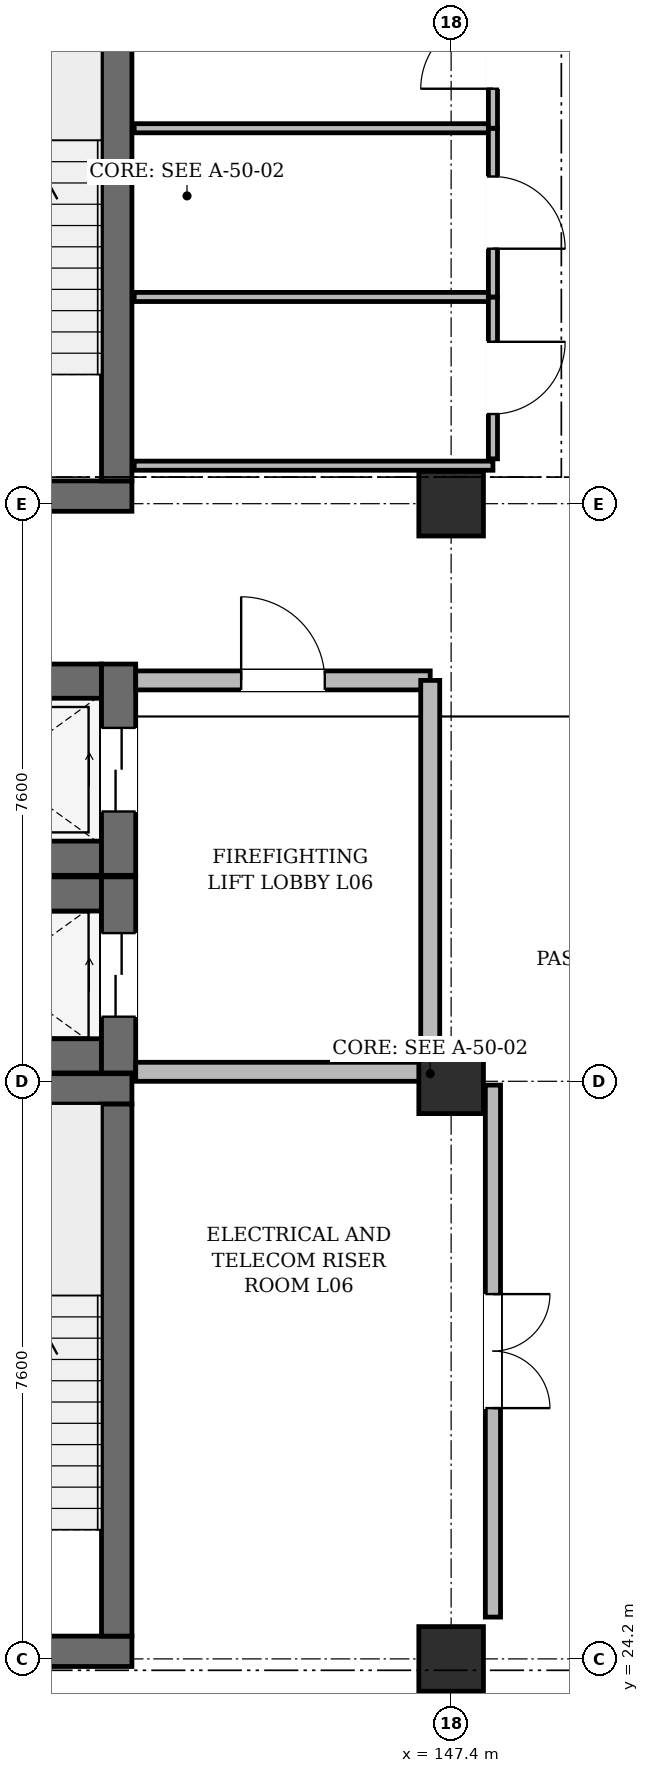
"""IFC4 building model, lengths in metres.
Left out: names, types, materials, properties, quantities, classifications, styles, units other than length and angle.
Written with IfcOpenShell. Run it as: python <this file> out.ifc"""

import sys

from ifc_helpers import new_model, si_unit, direction, frame, frame_2d, origin, origin_2d, place, context, subcontext, project, spatial, rectangle, extrude, element, fill, save


model = new_model("IFC4")
c1 = context("Model", 3, precision=1e-05, world=origin(), true_north=direction((0.0, 1.0)))
c2 = subcontext(c1, "Body", "Model", "MODEL_VIEW")
j1 = project(units=[si_unit("LENGTHUNIT", "METRE"), si_unit("PLANEANGLEUNIT", "RADIAN")], contexts=[c1])
p1 = place(None, origin())
s1 = spatial("IfcSite", under=j1, at=p1, CompositionType="ELEMENT")
p2 = place(p1, origin())
s2 = spatial("IfcBuilding", under=s1, at=p2, CompositionType="ELEMENT")
p3 = place(p2, frame((0.0, 0.0, 28.2)))
s3 = spatial("IfcBuildingStorey", under=s2, at=p3, CompositionType="ELEMENT", Elevation=28.2)
for number, where, z_axis, x_axis in (
    (1, (147.4, 24.2, 0.0), (0.0, 0.0, 1.0), (1.0, 0.0, 0.0)),
    (2, (147.4, 31.8, 0.0), (0.0, 0.0, 1.0), (1.0, 0.0, 0.0)),
    (3, (147.4, 39.4, 0.0), (0.0, 0.0, 1.0), (1.0, 0.0, 0.0)),
):
    element("IfcColumn", number, at=place(p3, frame(where, z_axis=z_axis, x_axis=x_axis)), inside=s3, PredefinedType="COLUMN", context=c2, shape_type="SweptSolid", body=[
        extrude(rectangle(XDim=0.85, YDim=0.85, at=origin_2d()), origin(), (0.0, 0.0, 1.0), 3.94),
    ])
p4 = place(p3, frame((139.4, 24.3, 0.0), z_axis=(0.0, 0.0, 1.0), x_axis=(1.0, 0.0, 0.0)))
e4 = element("IfcWall", 4, at=p4, inside=s3, PredefinedType="SHEAR", context=c2, shape_type="SweptSolid", body=[
    extrude(rectangle(XDim=3.8, YDim=0.4, at=frame_2d((1.9, 0.0))), origin(), (0.0, 0.0, 1.0), 3.94),
])
p5 = place(p4, frame((1.3, 0.0, 0.0)))
e5 = element("IfcOpeningElement", 5, at=p5, cuts=e4, PredefinedType="OPENING", context=c2, shape_type="SweptSolid", body=[
    extrude(rectangle(XDim=1.2, YDim=2.2, at=frame_2d((0.6, 1.1))), frame((0.0, 0.212, 0.0), z_axis=(0.0, -1.0, 0.0), x_axis=(1.0, 0.0, 0.0)), (0.0, 0.0, 1.0), 0.424),
])
p6 = place(p3, frame((139.4, 31.7, 0.0), z_axis=(0.0, 0.0, 1.0), x_axis=(1.0, 0.0, 0.0)))
e6 = element("IfcWall", 6, at=p6, inside=s3, PredefinedType="SHEAR", context=c2, shape_type="SweptSolid", body=[
    extrude(rectangle(XDim=3.8, YDim=0.4, at=frame_2d((1.9, 0.0))), origin(), (0.0, 0.0, 1.0), 3.94),
])
p7 = place(p3, frame((143.0, 24.5, 0.0), z_axis=(0.0, 0.0, 1.0), x_axis=(0.0, 1.0, 0.0)))
e7 = element("IfcWall", 7, at=p7, inside=s3, PredefinedType="SHEAR", context=c2, shape_type="SweptSolid", body=[
    extrude(rectangle(XDim=7.0, YDim=0.4, at=frame_2d((3.5, 0.0))), origin(), (0.0, 0.0, 1.0), 3.94),
])
p8 = place(p3, frame((139.4, 39.5, 0.0), z_axis=(0.0, 0.0, 1.0), x_axis=(1.0, 0.0, 0.0)))
e8 = element("IfcWall", 8, at=p8, inside=s3, PredefinedType="SHEAR", context=c2, shape_type="SweptSolid", body=[
    extrude(rectangle(XDim=3.8, YDim=0.4, at=frame_2d((1.9, 0.0))), origin(), (0.0, 0.0, 1.0), 3.94),
])
p9 = place(p8, frame((1.3, 0.0, 0.0)))
e9 = element("IfcOpeningElement", 9, at=p9, cuts=e8, PredefinedType="OPENING", context=c2, shape_type="SweptSolid", body=[
    extrude(rectangle(XDim=1.2, YDim=2.2, at=frame_2d((0.6, 1.1))), frame((0.0, 0.212, 0.0), z_axis=(0.0, -1.0, 0.0), x_axis=(1.0, 0.0, 0.0)), (0.0, 0.0, 1.0), 0.424),
])
p10 = place(p3, frame((143.0, 39.7, 0.0), z_axis=(0.0, 0.0, 1.0), x_axis=(0.0, 1.0, 0.0)))
e10 = element("IfcWall", 10, at=p10, inside=s3, PredefinedType="SHEAR", context=c2, shape_type="SweptSolid", body=[
    extrude(rectangle(XDim=7.0, YDim=0.4, at=frame_2d((3.5, 0.0))), origin(), (0.0, 0.0, 1.0), 3.94),
])
for number, where, z_axis, x_axis in (
    (11, (140.06, 32.135, 0.0), (0.0, 0.0, 1.0), (1.0, 0.0, 0.0)),
    (12, (140.06, 34.265, 0.0), (0.0, 0.0, 1.0), (1.0, 0.0, 0.0)),
):
    element("IfcWall", number, at=place(p3, frame(where, z_axis=z_axis, x_axis=x_axis)), inside=s3, PredefinedType="SHEAR", context=c2, shape_type="SweptSolid", body=[
        extrude(rectangle(XDim=2.74, YDim=0.45, at=frame_2d((1.37, 0.0))), origin(), (0.0, 0.0, 1.0), 3.94),
    ])
p11 = place(p3, frame((143.025, 31.91, 0.0), z_axis=(0.0, 0.0, 1.0), x_axis=(0.0, 1.0, 0.0)))
e13 = element("IfcWall", 13, at=p11, inside=s3, PredefinedType="SHEAR", context=c2, shape_type="SweptSolid", body=[
    extrude(rectangle(XDim=2.58, YDim=0.45, at=frame_2d((1.29, 0.0))), origin(), (0.0, 0.0, 1.0), 3.94),
])
p12 = place(p11, frame((0.74, 0.0, 0.0)))
e14 = element("IfcOpeningElement", 14, at=p12, cuts=e13, PredefinedType="OPENING", context=c2, shape_type="SweptSolid", body=[
    extrude(rectangle(XDim=1.1, YDim=2.2, at=frame_2d((0.55, 1.1))), frame((0.0, 0.237, 0.0), z_axis=(0.0, -1.0, 0.0), x_axis=(1.0, 0.0, 0.0)), (0.0, 0.0, 1.0), 0.474),
])
for number, where, z_axis, x_axis in (
    (15, (140.06, 34.735, 0.0), (0.0, 0.0, 1.0), (1.0, 0.0, 0.0)),
    (16, (140.06, 37.065, 0.0), (0.0, 0.0, 1.0), (1.0, 0.0, 0.0)),
):
    element("IfcWall", number, at=place(p3, frame(where, z_axis=z_axis, x_axis=x_axis)), inside=s3, PredefinedType="SHEAR", context=c2, shape_type="SweptSolid", body=[
        extrude(rectangle(XDim=2.74, YDim=0.45, at=frame_2d((1.37, 0.0))), origin(), (0.0, 0.0, 1.0), 3.94),
    ])
p13 = place(p3, frame((143.025, 34.51, 0.0), z_axis=(0.0, 0.0, 1.0), x_axis=(0.0, 1.0, 0.0)))
e17 = element("IfcWall", 17, at=p13, inside=s3, PredefinedType="SHEAR", context=c2, shape_type="SweptSolid", body=[
    extrude(rectangle(XDim=2.78, YDim=0.45, at=frame_2d((1.39, 0.0))), origin(), (0.0, 0.0, 1.0), 3.94),
])
p14 = place(p13, frame((0.84, 0.0, 0.0)))
e18 = element("IfcOpeningElement", 18, at=p14, cuts=e17, PredefinedType="OPENING", context=c2, shape_type="SweptSolid", body=[
    extrude(rectangle(XDim=1.1, YDim=2.2, at=frame_2d((0.55, 1.1))), frame((0.0, 0.237, 0.0), z_axis=(0.0, -1.0, 0.0), x_axis=(1.0, 0.0, 0.0)), (0.0, 0.0, 1.0), 0.474),
])
p15 = place(p3, frame((143.25, 37.075, 0.0), z_axis=(0.0, 0.0, 1.0), x_axis=(1.0, 0.0, 0.0)))
e19 = element("IfcWall", 19, at=p15, inside=s3, PredefinedType="SOLIDWALL", context=c2, shape_type="SweptSolid", body=[
    extrude(rectangle(XDim=3.875, YDim=0.25, at=frame_2d((1.938, 0.0))), origin(), (0.0, 0.0, 1.0), 3.805),
])
p16 = place(p15, frame((1.387, 0.0, 0.0)))
e20 = element("IfcOpeningElement", 20, at=p16, cuts=e19, PredefinedType="OPENING", context=c2, shape_type="SweptSolid", body=[
    extrude(rectangle(XDim=1.1, YDim=2.2, at=frame_2d((0.55, 1.1))), frame((0.0, 0.137, 0.0), z_axis=(0.0, -1.0, 0.0), x_axis=(1.0, 0.0, 0.0)), (0.0, 0.0, 1.0), 0.274),
])
p17 = place(p3, frame((143.25, 31.925, 0.0), z_axis=(0.0, 0.0, 1.0), x_axis=(1.0, 0.0, 0.0)))
e21 = element("IfcWall", 21, at=p17, inside=s3, PredefinedType="SOLIDWALL", context=c2, shape_type="SweptSolid", body=[
    extrude(rectangle(XDim=3.875, YDim=0.25, at=frame_2d((1.938, 0.0))), origin(), (0.0, 0.0, 1.0), 3.275),
])
p18 = place(p3, frame((147.125, 31.925, 0.0), z_axis=(0.0, 0.0, 1.0), x_axis=(0.0, 1.0, 0.0)))
e22 = element("IfcWall", 22, at=p18, inside=s3, PredefinedType="SOLIDWALL", context=c2, shape_type="SweptSolid", body=[
    extrude(rectangle(XDim=5.15, YDim=0.25, at=frame_2d((2.575, 0.0))), origin(), (0.0, 0.0, 1.0), 3.275),
])
p19 = place(p3, frame((143.23, 39.9, 0.0), z_axis=(0.0, 0.0, 1.0), x_axis=(1.0, 0.0, 0.0)))
e23 = element("IfcWall", 23, at=p19, inside=s3, PredefinedType="PARTITIONING", context=c2, shape_type="SweptSolid", body=[
    extrude(rectangle(XDim=4.72, YDim=0.12, at=frame_2d((2.36, 0.0))), origin(), (0.0, 0.0, 1.0), 3.805),
])
p20 = place(p3, frame((147.95, 31.75, 0.0), z_axis=(0.0, 0.0, 1.0), x_axis=(0.0, -1.0, 0.0)))
e24 = element("IfcWall", 24, at=p20, inside=s3, PredefinedType="PARTITIONING", context=c2, shape_type="SweptSolid", body=[
    extrude(rectangle(XDim=7.0, YDim=0.2, at=frame_2d((3.5, 0.0))), origin(), (0.0, 0.0, 1.0), 3.805),
])
p21 = place(p20, frame((2.75, 0.0, 0.0)))
e25 = element("IfcOpeningElement", 25, at=p21, cuts=e24, PredefinedType="OPENING", context=c2, shape_type="SweptSolid", body=[
    extrude(rectangle(XDim=1.5, YDim=2.2, at=frame_2d((0.75, 1.1))), frame((0.0, 0.112, 0.0), z_axis=(0.0, -1.0, 0.0), x_axis=(1.0, 0.0, 0.0)), (0.0, 0.0, 1.0), 0.224),
])
p22 = place(p3, frame((143.23, 42.12, 0.0), z_axis=(0.0, 0.0, 1.0), x_axis=(1.0, 0.0, 0.0)))
e26 = element("IfcWall", 26, at=p22, inside=s3, PredefinedType="PARTITIONING", context=c2, shape_type="SweptSolid", body=[
    extrude(rectangle(XDim=4.72, YDim=0.12, at=frame_2d((2.36, 0.0))), origin(), (0.0, 0.0, 1.0), 3.415),
])
p23 = place(p3, frame((147.95, 42.12, 0.0), z_axis=(0.0, 0.0, 1.0), x_axis=(0.0, -1.0, 0.0)))
e27 = element("IfcWall", 27, at=p23, inside=s3, PredefinedType="PARTITIONING", context=c2, shape_type="SweptSolid", body=[
    extrude(rectangle(XDim=2.13, YDim=0.12, at=frame_2d((1.065, 0.0))), origin(), (0.0, 0.0, 1.0), 3.805),
])
p24 = place(p23, frame((0.59, 0.0, 0.0)))
e28 = element("IfcOpeningElement", 28, at=p24, cuts=e27, PredefinedType="OPENING", context=c2, shape_type="SweptSolid", body=[
    extrude(rectangle(XDim=0.95, YDim=2.15, at=frame_2d((0.475, 1.075))), frame((0.0, 0.072, 0.0), z_axis=(0.0, -1.0, 0.0), x_axis=(1.0, 0.0, 0.0)), (0.0, 0.0, 1.0), 0.144),
])
p25 = place(p3, frame((143.23, 44.34, 0.0), z_axis=(0.0, 0.0, 1.0), x_axis=(1.0, 0.0, 0.0)))
e29 = element("IfcWall", 29, at=p25, inside=s3, PredefinedType="PARTITIONING", context=c2, shape_type="SweptSolid", body=[
    extrude(rectangle(XDim=4.72, YDim=0.12, at=frame_2d((2.36, 0.0))), origin(), (0.0, 0.0, 1.0), 3.365),
])
p26 = place(p3, frame((147.95, 44.34, 0.0), z_axis=(0.0, 0.0, 1.0), x_axis=(0.0, -1.0, 0.0)))
e30 = element("IfcWall", 30, at=p26, inside=s3, PredefinedType="PARTITIONING", context=c2, shape_type="SweptSolid", body=[
    extrude(rectangle(XDim=2.22, YDim=0.12, at=frame_2d((1.11, 0.0))), origin(), (0.0, 0.0, 1.0), 3.805),
])
p27 = place(p26, frame((0.635, 0.0, 0.0)))
e31 = element("IfcOpeningElement", 31, at=p27, cuts=e30, PredefinedType="OPENING", context=c2, shape_type="SweptSolid", body=[
    extrude(rectangle(XDim=0.95, YDim=2.15, at=frame_2d((0.475, 1.075))), frame((0.0, 0.072, 0.0), z_axis=(0.0, -1.0, 0.0), x_axis=(1.0, 0.0, 0.0)), (0.0, 0.0, 1.0), 0.144),
])
p28 = place(p3, frame((147.95, 46.33, 0.0), z_axis=(0.0, 0.0, 1.0), x_axis=(0.0, -1.0, 0.0)))
e32 = element("IfcWall", 32, at=p28, inside=s3, PredefinedType="PARTITIONING", context=c2, shape_type="SweptSolid", body=[
    extrude(rectangle(XDim=1.99, YDim=0.12, at=frame_2d((0.995, 0.0))), origin(), (0.0, 0.0, 1.0), 3.805),
])
p29 = place(p28, frame((0.52, 0.0, 0.0)))
e33 = element("IfcOpeningElement", 33, at=p29, cuts=e32, PredefinedType="OPENING", context=c2, shape_type="SweptSolid", body=[
    extrude(rectangle(XDim=0.95, YDim=2.15, at=frame_2d((0.475, 1.075))), frame((0.0, 0.072, 0.0), z_axis=(0.0, -1.0, 0.0), x_axis=(1.0, 0.0, 0.0)), (0.0, 0.0, 1.0), 0.144),
])
p30 = place(p12, origin())
e34 = element("IfcDoor", 34, at=p30, inside=s3, OperationType="DOUBLE_DOOR_SLIDING", PredefinedType="DOOR", context=c2, shape_type="SweptSolid", body=[
    extrude(rectangle(XDim=1.1, YDim=2.2, at=frame_2d((0.55, 1.1))), frame((0.0, 0.025, 0.0), z_axis=(0.0, -1.0, 0.0), x_axis=(1.0, 0.0, 0.0)), (0.0, 0.0, 1.0), 0.05),
])
fill(e14, e34)
p31 = place(p14, origin())
e35 = element("IfcDoor", 35, at=p31, inside=s3, OperationType="DOUBLE_DOOR_SLIDING", PredefinedType="DOOR", context=c2, shape_type="SweptSolid", body=[
    extrude(rectangle(XDim=1.1, YDim=2.2, at=frame_2d((0.55, 1.1))), frame((0.0, 0.025, 0.0), z_axis=(0.0, -1.0, 0.0), x_axis=(1.0, 0.0, 0.0)), (0.0, 0.0, 1.0), 0.05),
])
fill(e18, e35)
p32 = place(p16, origin())
e36 = element("IfcDoor", 36, at=p32, inside=s3, OperationType="SINGLE_SWING_LEFT", PredefinedType="DOOR", context=c2, shape_type="SweptSolid", body=[
    extrude(rectangle(XDim=1.1, YDim=2.2, at=frame_2d((0.55, 1.1))), frame((0.0, 0.025, 0.0), z_axis=(0.0, -1.0, 0.0), x_axis=(1.0, 0.0, 0.0)), (0.0, 0.0, 1.0), 0.05),
])
fill(e20, e36)
p33 = place(p21, origin())
e37 = element("IfcDoor", 37, at=p33, inside=s3, OperationType="DOUBLE_DOOR_SINGLE_SWING", PredefinedType="DOOR", context=c2, shape_type="SweptSolid", body=[
    extrude(rectangle(XDim=1.5, YDim=2.2, at=frame_2d((0.75, 1.1))), frame((0.0, 0.025, 0.0), z_axis=(0.0, -1.0, 0.0), x_axis=(1.0, 0.0, 0.0)), (0.0, 0.0, 1.0), 0.05),
])
fill(e25, e37)
p34 = place(p24, origin())
e38 = element("IfcDoor", 38, at=p34, inside=s3, OperationType="SINGLE_SWING_LEFT", PredefinedType="DOOR", context=c2, shape_type="SweptSolid", body=[
    extrude(rectangle(XDim=0.95, YDim=2.15, at=frame_2d((0.475, 1.075))), frame((0.0, 0.025, 0.0), z_axis=(0.0, -1.0, 0.0), x_axis=(1.0, 0.0, 0.0)), (0.0, 0.0, 1.0), 0.05),
])
fill(e28, e38)
p35 = place(p27, origin())
e39 = element("IfcDoor", 39, at=p35, inside=s3, OperationType="SINGLE_SWING_RIGHT", PredefinedType="DOOR", context=c2, shape_type="SweptSolid", body=[
    extrude(rectangle(XDim=0.95, YDim=2.15, at=frame_2d((0.475, 1.075))), frame((0.0, 0.025, 0.0), z_axis=(0.0, -1.0, 0.0), x_axis=(1.0, 0.0, 0.0)), (0.0, 0.0, 1.0), 0.05),
])
fill(e31, e39)
p36 = place(p29, frame((0.95, 0.0, 0.0), z_axis=(0.0, 0.0, 1.0), x_axis=(-1.0, 0.0, 0.0)))
e40 = element("IfcDoor", 40, at=p36, inside=s3, OperationType="SINGLE_SWING_LEFT", PredefinedType="DOOR", context=c2, shape_type="SweptSolid", body=[
    extrude(rectangle(XDim=0.95, YDim=2.15, at=frame_2d((0.475, 1.075))), frame((0.0, 0.025, 0.0), z_axis=(0.0, -1.0, 0.0), x_axis=(1.0, 0.0, 0.0)), (0.0, 0.0, 1.0), 0.05),
])
fill(e33, e40)
save(model, sys.argv[1])
